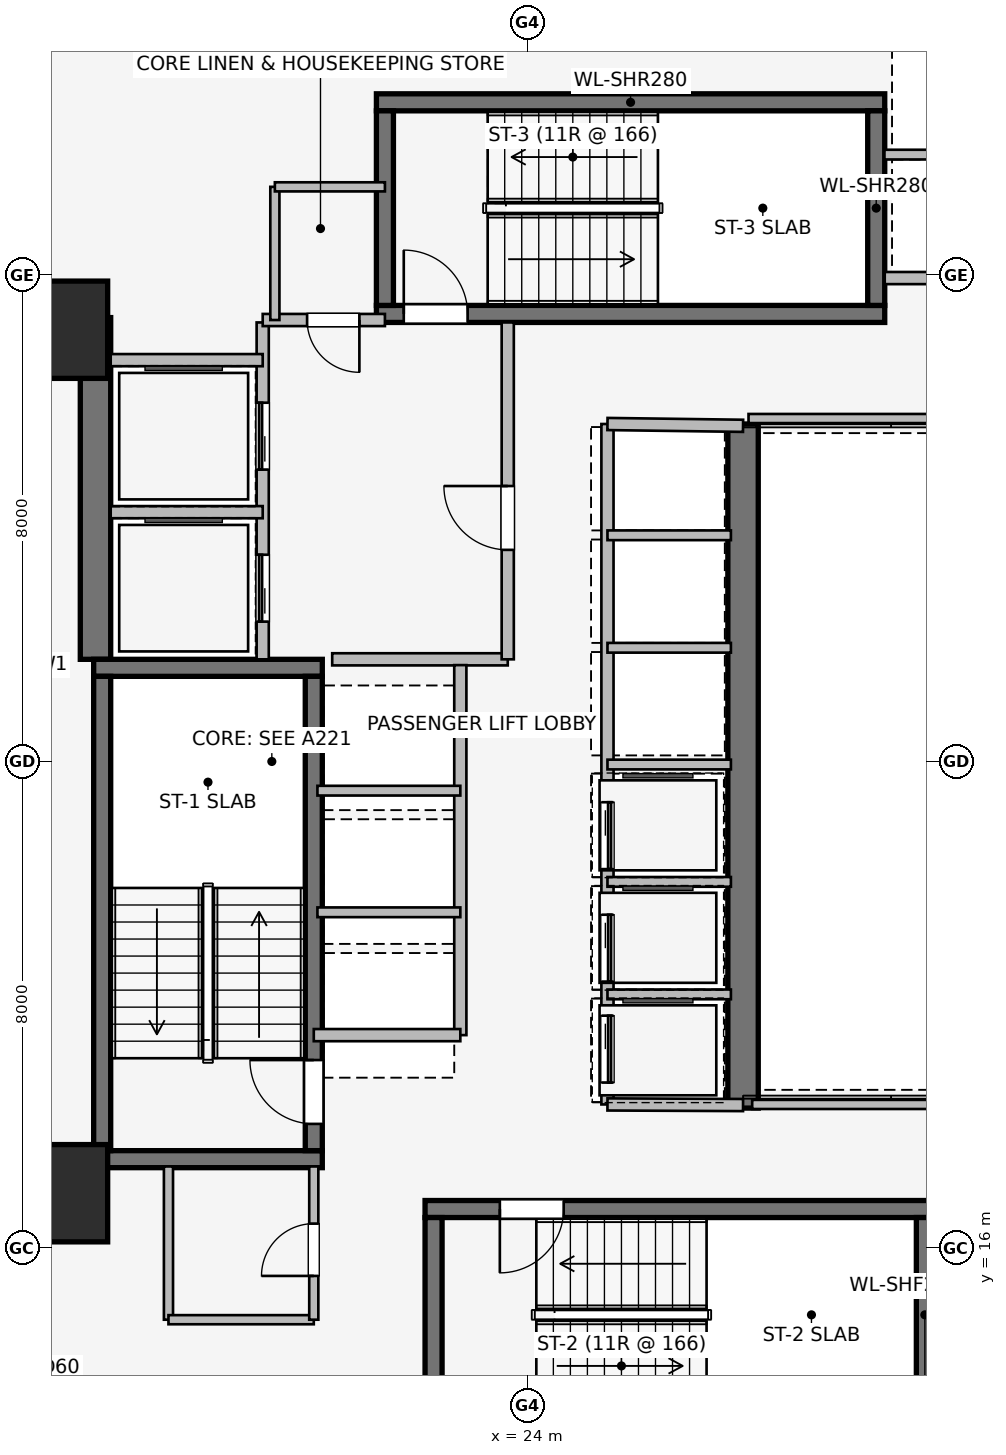
"""IFC4 building model, lengths in metres.
Left out: names, types, materials, properties, quantities, classifications, styles, units other than length and angle.
Written with IfcOpenShell. Run it as: python <this file> out.ifc"""

import sys

from ifc_helpers import new_model, si_unit, direction, frame, frame_2d, origin, origin_2d, place, context, subcontext, project, spatial, rectangle, extrude, element, fill, save


model = new_model("IFC4")
c1 = context("Model", 3, precision=1e-05, world=origin(), true_north=direction((0.0, 1.0)))
c2 = subcontext(c1, "Body", "Model", "MODEL_VIEW")
j1 = project(units=[si_unit("LENGTHUNIT", "METRE"), si_unit("PLANEANGLEUNIT", "RADIAN")], contexts=[c1])
p1 = place(None, origin())
s1 = spatial("IfcSite", under=j1, at=p1, CompositionType="ELEMENT")
p2 = place(p1, origin())
s2 = spatial("IfcBuilding", under=s1, at=p2, CompositionType="ELEMENT")
p3 = place(p2, frame((0.0, 0.0, 74.45)))
s3 = spatial("IfcBuildingStorey", under=s2, at=p3, CompositionType="ELEMENT", Elevation=74.45)
p4 = place(p3, frame((16.9, 25.68, 0.0), z_axis=(0.0, 0.0, 1.0), x_axis=(0.0, 1.0, 0.0)))
e1 = element("IfcWall", 1, at=p4, inside=s3, PredefinedType="SHEAR", context=c2, shape_type="SweptSolid", body=[
    extrude(rectangle(XDim=5.62, YDim=0.5, at=frame_2d((2.81, 0.0))), origin(), (0.0, 0.0, 1.0), 3.65),
])
p5 = place(p3, frame((27.55, 29.55, 0.0), z_axis=(0.0, 0.0, 1.0), x_axis=(0.0, -1.0, 0.0)))
e2 = element("IfcWall", 2, at=p5, inside=s3, PredefinedType="SHEAR", context=c2, shape_type="SweptSolid", body=[
    extrude(rectangle(XDim=11.25, YDim=0.5, at=frame_2d((5.625, 0.0))), origin(), (0.0, 0.0, 1.0), 3.65),
])
for number, where, z_axis, x_axis in (
    (3, (16.87, 17.46, 0.0), (0.0, 0.0, 1.0), (1.0, 0.0, 0.0)),
    (4, (20.63, 25.54, 0.0), (0.0, 0.0, 1.0), (-1.0, 0.0, 0.0)),
):
    element("IfcWall", number, at=place(p3, frame(where, z_axis=z_axis, x_axis=x_axis)), inside=s3, PredefinedType="SHEAR", context=c2, shape_type="SweptSolid", body=[
        extrude(rectangle(XDim=3.76, YDim=0.28, at=frame_2d((1.88, 0.0))), origin(), (0.0, 0.0, 1.0), 3.65),
    ])
p6 = place(p3, frame((17.01, 25.4, 0.0), z_axis=(0.0, 0.0, 1.0), x_axis=(0.0, -1.0, 0.0)))
e5 = element("IfcWall", 5, at=p6, inside=s3, PredefinedType="SHEAR", context=c2, shape_type="SweptSolid", body=[
    extrude(rectangle(XDim=7.8, YDim=0.28, at=frame_2d((3.9, 0.0))), origin(), (0.0, 0.0, 1.0), 3.65),
])
p7 = place(p3, frame((20.49, 17.6, 0.0), z_axis=(0.0, 0.0, 1.0), x_axis=(0.0, 1.0, 0.0)))
e6 = element("IfcWall", 6, at=p7, inside=s3, PredefinedType="SHEAR", context=c2, shape_type="SweptSolid", body=[
    extrude(rectangle(XDim=7.8, YDim=0.28, at=frame_2d((3.9, 0.0))), origin(), (0.0, 0.0, 1.0), 3.65),
])
p8 = place(p7, frame((0.44, 0.0, 0.0)))
e7 = element("IfcOpeningElement", 7, at=p8, cuts=e6, PredefinedType="OPENING", context=c2, shape_type="SweptSolid", body=[
    extrude(rectangle(XDim=1.05, YDim=2.0, at=frame_2d((0.525, 1.0))), frame((0.0, 0.15, 0.0), z_axis=(0.0, -1.0, 0.0), x_axis=(1.0, 0.0, 0.0)), (0.0, 0.0, 1.0), 0.3),
])
p9 = place(p3, frame((30.68, 16.64, 0.0), z_axis=(0.0, 0.0, 1.0), x_axis=(-1.0, 0.0, 0.0)))
e8 = element("IfcWall", 8, at=p9, inside=s3, PredefinedType="SHEAR", context=c2, shape_type="SweptSolid", body=[
    extrude(rectangle(XDim=8.36, YDim=0.28, at=frame_2d((4.18, 0.0))), origin(), (0.0, 0.0, 1.0), 3.65),
])
p10 = place(p9, frame((6.08, 0.0, 0.0)))
e9 = element("IfcOpeningElement", 9, at=p10, cuts=e8, PredefinedType="OPENING", context=c2, shape_type="SweptSolid", body=[
    extrude(rectangle(XDim=1.05, YDim=2.0, at=frame_2d((0.525, 1.0))), frame((0.0, 0.15, 0.0), z_axis=(0.0, -1.0, 0.0), x_axis=(1.0, 0.0, 0.0)), (0.0, 0.0, 1.0), 0.3),
])
for number, where, z_axis, x_axis in (
    (10, (22.46, 16.5, 0.0), (0.0, 0.0, 1.0), (0.0, -1.0, 0.0)),
    (11, (30.54, 13.3, 0.0), (0.0, 0.0, 1.0), (0.0, 1.0, 0.0)),
):
    element("IfcWall", number, at=place(p3, frame(where, z_axis=z_axis, x_axis=x_axis)), inside=s3, PredefinedType="SHEAR", context=c2, shape_type="SweptSolid", body=[
        extrude(rectangle(XDim=3.2, YDim=0.28, at=frame_2d((1.6, 0.0))), origin(), (0.0, 0.0, 1.0), 3.65),
    ])
p11 = place(p3, frame((21.52, 31.36, 0.0), z_axis=(0.0, 0.0, 1.0), x_axis=(1.0, 0.0, 0.0)))
e12 = element("IfcWall", 12, at=p11, inside=s3, PredefinedType="SHEAR", context=c2, shape_type="SweptSolid", body=[
    extrude(rectangle(XDim=8.36, YDim=0.28, at=frame_2d((4.18, 0.0))), origin(), (0.0, 0.0, 1.0), 3.65),
])
p12 = place(p11, frame((0.45, 0.0, 0.0)))
e13 = element("IfcOpeningElement", 13, at=p12, cuts=e12, PredefinedType="OPENING", context=c2, shape_type="SweptSolid", body=[
    extrude(rectangle(XDim=1.05, YDim=2.0, at=frame_2d((0.525, 1.0))), frame((0.0, 0.15, 0.0), z_axis=(0.0, -1.0, 0.0), x_axis=(1.0, 0.0, 0.0)), (0.0, 0.0, 1.0), 0.3),
])
p13 = place(p3, frame((29.88, 34.84, 0.0), z_axis=(0.0, 0.0, 1.0), x_axis=(-1.0, 0.0, 0.0)))
e14 = element("IfcWall", 14, at=p13, inside=s3, PredefinedType="SHEAR", context=c2, shape_type="SweptSolid", body=[
    extrude(rectangle(XDim=8.36, YDim=0.28, at=frame_2d((4.18, 0.0))), origin(), (0.0, 0.0, 1.0), 3.65),
])
for number, where, z_axis, x_axis in (
    (15, (21.66, 34.7, 0.0), (0.0, 0.0, 1.0), (0.0, -1.0, 0.0)),
    (16, (29.74, 31.5, 0.0), (0.0, 0.0, 1.0), (0.0, 1.0, 0.0)),
):
    element("IfcWall", number, at=place(p3, frame(where, z_axis=z_axis, x_axis=x_axis)), inside=s3, PredefinedType="SHEAR", context=c2, shape_type="SweptSolid", body=[
        extrude(rectangle(XDim=3.2, YDim=0.28, at=frame_2d((1.6, 0.0))), origin(), (0.0, 0.0, 1.0), 3.65),
    ])
for number, where, z_axis, x_axis in (
    (17, (16.3, 16.9, 0.0), (0.0, 0.0, 1.0), (1.0, 0.0, 0.0)),
    (18, (16.3, 31.1, 0.0), (0.0, 0.0, 1.0), (1.0, 0.0, 0.0)),
):
    element("IfcColumn", number, at=place(p3, frame(where, z_axis=z_axis, x_axis=x_axis)), inside=s3, PredefinedType="COLUMN", context=c2, shape_type="SweptSolid", body=[
        extrude(rectangle(XDim=1.6, YDim=1.6, at=origin_2d()), origin(), (0.0, 0.0, 1.0), 3.65),
    ])
p14 = place(p3, frame((19.65, 25.68, 0.0), z_axis=(0.0, 0.0, 1.0), x_axis=(0.0, 1.0, 0.0)))
e19 = element("IfcWall", 19, at=p14, inside=s3, PredefinedType="PARTITIONING", context=c2, shape_type="SweptSolid", body=[
    extrude(rectangle(XDim=5.54, YDim=0.2, at=frame_2d((2.77, 0.0))), origin(), (0.0, 0.0, 1.0), 3.39),
])
p15 = place(p14, frame((0.62, 0.0, 0.0)))
e20 = element("IfcOpeningElement", 20, at=p15, cuts=e19, PredefinedType="OPENING", context=c2, shape_type="SweptSolid", body=[
    extrude(rectangle(XDim=1.1, YDim=2.2, at=frame_2d((0.55, 1.1))), frame((0.0, 0.11, 0.0), z_axis=(0.0, -1.0, 0.0), x_axis=(1.0, 0.0, 0.0)), (0.0, 0.0, 1.0), 0.22),
])
p16 = place(p14, frame((3.12, 0.0, 0.0)))
e21 = element("IfcOpeningElement", 21, at=p16, cuts=e19, PredefinedType="OPENING", context=c2, shape_type="SweptSolid", body=[
    extrude(rectangle(XDim=1.1, YDim=2.2, at=frame_2d((0.55, 1.1))), frame((0.0, 0.11, 0.0), z_axis=(0.0, -1.0, 0.0), x_axis=(1.0, 0.0, 0.0)), (0.0, 0.0, 1.0), 0.22),
])
p17 = place(p3, frame((20.793, 25.68, 0.0), z_axis=(0.0, 0.0, 1.0), x_axis=(1.0, 0.0, 0.0)))
e22 = element("IfcWall", 22, at=p17, inside=s3, PredefinedType="PARTITIONING", context=c2, shape_type="SweptSolid", body=[
    extrude(rectangle(XDim=2.887, YDim=0.2, at=frame_2d((1.443, 0.0))), origin(), (0.0, 0.0, 1.0), 3.39),
])
p18 = place(p3, frame((23.68, 25.68, 0.0), z_axis=(0.0, 0.0, 1.0), x_axis=(0.0, 1.0, 0.0)))
e23 = element("IfcWall", 23, at=p18, inside=s3, PredefinedType="PARTITIONING", context=c2, shape_type="SweptSolid", body=[
    extrude(rectangle(XDim=5.54, YDim=0.2, at=frame_2d((2.77, 0.0))), origin(), (0.0, 0.0, 1.0), 3.39),
])
p19 = place(p18, frame((1.8, 0.0, 0.0)))
e24 = element("IfcOpeningElement", 24, at=p19, cuts=e23, PredefinedType="OPENING", context=c2, shape_type="SweptSolid", body=[
    extrude(rectangle(XDim=1.05, YDim=2.0, at=frame_2d((0.525, 1.0))), frame((0.0, 0.11, 0.0), z_axis=(0.0, -1.0, 0.0), x_axis=(1.0, 0.0, 0.0)), (0.0, 0.0, 1.0), 0.22),
])
p20 = place(p3, frame((21.66, 31.26, 0.0), z_axis=(0.0, 0.0, 1.0), x_axis=(-1.0, 0.0, 0.0)))
e25 = element("IfcWall", 25, at=p20, inside=s3, PredefinedType="PARTITIONING", context=c2, shape_type="SweptSolid", body=[
    extrude(rectangle(XDim=2.01, YDim=0.2, at=frame_2d((1.005, 0.0))), origin(), (0.0, 0.0, 1.0), 3.39),
])
p21 = place(p20, frame((0.42, 0.0, 0.0)))
e26 = element("IfcOpeningElement", 26, at=p21, cuts=e25, PredefinedType="OPENING", context=c2, shape_type="SweptSolid", body=[
    extrude(rectangle(XDim=0.86, YDim=2.0, at=frame_2d((0.43, 1.0))), frame((0.0, 0.11, 0.0), z_axis=(0.0, -1.0, 0.0), x_axis=(1.0, 0.0, 0.0)), (0.0, 0.0, 1.0), 0.22),
])
p22 = place(p3, frame((17.15, 28.1, 0.0), z_axis=(0.0, 0.0, 1.0), x_axis=(1.0, 0.0, 0.0)))
e27 = element("IfcWall", 27, at=p22, inside=s3, PredefinedType="PARTITIONING", context=c2, shape_type="SweptSolid", body=[
    extrude(rectangle(XDim=2.5, YDim=0.2, at=frame_2d((1.25, 0.0))), origin(), (0.0, 0.0, 1.0), 3.39),
])
p23 = place(p3, frame((19.65, 30.6, 0.0), z_axis=(0.0, 0.0, 1.0), x_axis=(-1.0, 0.0, 0.0)))
e28 = element("IfcWall", 28, at=p23, inside=s3, PredefinedType="PARTITIONING", context=c2, shape_type="SweptSolid", body=[
    extrude(rectangle(XDim=2.5, YDim=0.2, at=frame_2d((1.25, 0.0))), origin(), (0.0, 0.0, 1.0), 2.29),
])
p24 = place(p3, frame((32.48, 31.95, 0.0), z_axis=(0.0, 0.0, 1.0), x_axis=(-1.0, 0.0, 0.0)))
e29 = element("IfcWall", 29, at=p24, inside=s3, PredefinedType="PARTITIONING", context=c2, shape_type="SweptSolid", body=[
    extrude(rectangle(XDim=2.6, YDim=0.2, at=frame_2d((1.3, 0.0))), origin(), (0.0, 0.0, 1.0), 3.39),
])
p25 = place(p3, frame((29.875, 33.98, 0.0), z_axis=(0.0, 0.0, 1.0), x_axis=(1.0, 0.0, 0.0)))
e30 = element("IfcWall", 30, at=p25, inside=s3, PredefinedType="PARTITIONING", context=c2, shape_type="SweptSolid", body=[
    extrude(rectangle(XDim=2.605, YDim=0.16, at=frame_2d((1.302, 0.0))), origin(), (0.0, 0.0, 1.0), 3.39),
])
p26 = place(p3, frame((22.9, 19.5, 0.0), z_axis=(0.0, 0.0, 1.0), x_axis=(0.0, 1.0, 0.0)))
e31 = element("IfcWall", 31, at=p26, inside=s3, PredefinedType="PARTITIONING", context=c2, shape_type="SweptSolid", body=[
    extrude(rectangle(XDim=6.085, YDim=0.2, at=frame_2d((3.042, 0.0))), origin(), (0.0, 0.0, 1.0), 3.39),
])
p27 = place(p3, frame((20.49, 19.5, 0.0), z_axis=(0.0, 0.0, 1.0), x_axis=(1.0, 0.0, 0.0)))
e32 = element("IfcWall", 32, at=p27, inside=s3, PredefinedType="PARTITIONING", context=c2, shape_type="SweptSolid", body=[
    extrude(rectangle(XDim=2.41, YDim=0.2, at=frame_2d((1.205, 0.0))), origin(), (0.0, 0.0, 1.0), 2.29),
])
for number, where, z_axis, x_axis in (
    (33, (20.55, 21.52, 0.0), (0.0, 0.0, 1.0), (1.0, 0.0, 0.0)),
    (34, (20.55, 23.52, 0.0), (0.0, 0.0, 1.0), (1.0, 0.0, 0.0)),
):
    element("IfcWall", number, at=place(p3, frame(where, z_axis=z_axis, x_axis=x_axis)), inside=s3, PredefinedType="PARTITIONING", context=c2, shape_type="SweptSolid", body=[
        extrude(rectangle(XDim=2.35, YDim=0.16, at=frame_2d((1.175, 0.0))), origin(), (0.0, 0.0, 1.0), 3.39),
    ])
p28 = place(p3, frame((25.32, 29.55, 0.0), z_axis=(0.0, 0.0, 1.0), x_axis=(0.0, -1.0, 0.0)))
e35 = element("IfcWall", 35, at=p28, inside=s3, PredefinedType="PARTITIONING", context=c2, shape_type="SweptSolid", body=[
    extrude(rectangle(XDim=11.19, YDim=0.2, at=frame_2d((5.595, 0.0))), origin(), (0.0, 0.0, 1.0), 3.39),
])
p29 = place(p28, frame((6.22, 0.0, 0.0)))
e36 = element("IfcOpeningElement", 36, at=p29, cuts=e35, PredefinedType="OPENING", context=c2, shape_type="SweptSolid", body=[
    extrude(rectangle(XDim=1.1, YDim=2.2, at=frame_2d((0.55, 1.1))), frame((0.0, 0.11, 0.0), z_axis=(0.0, -1.0, 0.0), x_axis=(1.0, 0.0, 0.0)), (0.0, 0.0, 1.0), 0.22),
])
p30 = place(p28, frame((8.07, 0.0, 0.0)))
e37 = element("IfcOpeningElement", 37, at=p30, cuts=e35, PredefinedType="OPENING", context=c2, shape_type="SweptSolid", body=[
    extrude(rectangle(XDim=1.1, YDim=2.2, at=frame_2d((0.55, 1.1))), frame((0.0, 0.11, 0.0), z_axis=(0.0, -1.0, 0.0), x_axis=(1.0, 0.0, 0.0)), (0.0, 0.0, 1.0), 0.22),
])
p31 = place(p28, frame((9.73, 0.0, 0.0)))
e38 = element("IfcOpeningElement", 38, at=p31, cuts=e35, PredefinedType="OPENING", context=c2, shape_type="SweptSolid", body=[
    extrude(rectangle(XDim=1.1, YDim=2.2, at=frame_2d((0.55, 1.1))), frame((0.0, 0.11, 0.0), z_axis=(0.0, -1.0, 0.0), x_axis=(1.0, 0.0, 0.0)), (0.0, 0.0, 1.0), 0.22),
])
p32 = place(p3, frame((25.32, 18.36, 0.0), z_axis=(0.0, 0.0, 1.0), x_axis=(0.999989925833, -0.004488678231, 0.0)))
e39 = element("IfcWall", 39, at=p32, inside=s3, PredefinedType="PARTITIONING", context=c2, shape_type="SweptSolid", body=[
    extrude(rectangle(XDim=2.23, YDim=0.2, at=frame_2d((1.115, 0.0))), origin(), (0.0, 0.0, 1.0), 3.39),
])
p33 = place(p3, frame((27.55, 29.52, 0.0), z_axis=(0.0, 0.0, 1.0), x_axis=(-0.999909343457, 0.013464949556, 0.0)))
e40 = element("IfcWall", 40, at=p33, inside=s3, PredefinedType="PARTITIONING", context=c2, shape_type="SweptSolid", body=[
    extrude(rectangle(XDim=2.23, YDim=0.2, at=frame_2d((1.115, 0.0))), origin(), (0.0, 0.0, 1.0), 2.29),
])
for number, where, z_axis, x_axis in (
    (41, (25.32, 20.17, 0.0), (0.0, 0.0, 1.0), (1.0, 0.0, 0.0)),
    (42, (25.32, 22.02, 0.0), (0.0, 0.0, 1.0), (1.0, 0.0, 0.0)),
    (43, (25.32, 23.95, 0.0), (0.0, 0.0, 1.0), (1.0, 0.0, 0.0)),
    (44, (25.32, 25.87, 0.0), (0.0, 0.0, 1.0), (1.0, 0.0, 0.0)),
    (45, (25.32, 27.72, 0.0), (0.0, 0.0, 1.0), (1.0, 0.0, 0.0)),
):
    element("IfcWall", number, at=place(p3, frame(where, z_axis=z_axis, x_axis=x_axis)), inside=s3, PredefinedType="PARTITIONING", context=c2, shape_type="SweptSolid", body=[
        extrude(rectangle(XDim=2.03, YDim=0.16, at=frame_2d((1.015, 0.0))), origin(), (0.0, 0.0, 1.0), 3.39),
    ])
p34 = place(p3, frame((18.1, 17.34, 0.0), z_axis=(0.0, 0.0, 1.0), x_axis=(0.0, -1.0, 0.0)))
e46 = element("IfcWall", 46, at=p34, inside=s3, PredefinedType="PARTITIONING", context=c2, shape_type="SweptSolid", body=[
    extrude(rectangle(XDim=2.52, YDim=0.15, at=frame_2d((1.26, 0.0))), origin(), (0.0, 0.0, 1.0), 3.39),
])
p35 = place(p3, frame((18.1, 14.82, 0.0), z_axis=(0.0, 0.0, 1.0), x_axis=(1.0, 0.0, 0.0)))
e47 = element("IfcWall", 47, at=p35, inside=s3, PredefinedType="PARTITIONING", context=c2, shape_type="SweptSolid", body=[
    extrude(rectangle(XDim=2.39, YDim=0.15, at=frame_2d((1.195, 0.0))), origin(), (0.0, 0.0, 1.0), 3.39),
])
p36 = place(p3, frame((20.49, 14.82, 0.0), z_axis=(0.0, 0.0, 1.0), x_axis=(0.0, 1.0, 0.0)))
e48 = element("IfcWall", 48, at=p36, inside=s3, PredefinedType="PARTITIONING", context=c2, shape_type="SweptSolid", body=[
    extrude(rectangle(XDim=2.52, YDim=0.15, at=frame_2d((1.26, 0.0))), origin(), (0.0, 0.0, 1.0), 3.39),
])
p37 = place(p36, frame((0.72, 0.0, 0.0)))
e49 = element("IfcOpeningElement", 49, at=p37, cuts=e48, PredefinedType="OPENING", context=c2, shape_type="SweptSolid", body=[
    extrude(rectangle(XDim=0.86, YDim=2.0, at=frame_2d((0.43, 1.0))), frame((0.0, 0.085, 0.0), z_axis=(0.0, -1.0, 0.0), x_axis=(1.0, 0.0, 0.0)), (0.0, 0.0, 1.0), 0.17),
])
p38 = place(p3, frame((19.85, 33.45, 0.0), z_axis=(0.0, 0.0, 1.0), x_axis=(0.0, -1.0, 0.0)))
e50 = element("IfcWall", 50, at=p38, inside=s3, PredefinedType="PARTITIONING", context=c2, shape_type="SweptSolid", body=[
    extrude(rectangle(XDim=2.19, YDim=0.15, at=frame_2d((1.095, 0.0))), origin(), (0.0, 0.0, 1.0), 3.39),
])
p39 = place(p3, frame((21.66, 33.45, 0.0), z_axis=(0.0, 0.0, 1.0), x_axis=(-1.0, 0.0, 0.0)))
e51 = element("IfcWall", 51, at=p39, inside=s3, PredefinedType="PARTITIONING", context=c2, shape_type="SweptSolid", body=[
    extrude(rectangle(XDim=1.81, YDim=0.15, at=frame_2d((0.905, 0.0))), origin(), (0.0, 0.0, 1.0), 3.39),
])
p40 = place(p3, frame((27.7, 18.36, 0.0), z_axis=(0.0, 0.0, 1.0), x_axis=(1.0, 0.0, 0.0)))
e52 = element("IfcWall", 52, at=p40, inside=s3, PredefinedType="PARTITIONING", context=c2, shape_type="SweptSolid", body=[
    extrude(rectangle(XDim=12.14, YDim=0.15, at=frame_2d((6.07, 0.0))), origin(), (0.0, 0.0, 1.0), 2.531),
])
p41 = place(p3, frame((39.84, 29.64, 0.0), z_axis=(0.0, 0.0, 1.0), x_axis=(-1.0, 0.0, 0.0)))
e53 = element("IfcWall", 53, at=p41, inside=s3, PredefinedType="PARTITIONING", context=c2, shape_type="SweptSolid", body=[
    extrude(rectangle(XDim=12.2, YDim=0.15, at=frame_2d((6.1, 0.0))), origin(), (0.0, 0.0, 1.0), 2.531),
])
p42 = place(p8, origin())
e54 = element("IfcDoor", 54, at=p42, inside=s3, OperationType="SINGLE_SWING_RIGHT", PredefinedType="DOOR", context=c2, shape_type="SweptSolid", body=[
    extrude(rectangle(XDim=1.05, YDim=2.0, at=frame_2d((0.525, 1.0))), frame((0.0, 0.025, 0.0), z_axis=(0.0, -1.0, 0.0), x_axis=(1.0, 0.0, 0.0)), (0.0, 0.0, 1.0), 0.05),
])
fill(e7, e54)
p43 = place(p10, origin())
e55 = element("IfcDoor", 55, at=p43, inside=s3, OperationType="SINGLE_SWING_RIGHT", PredefinedType="DOOR", context=c2, shape_type="SweptSolid", body=[
    extrude(rectangle(XDim=1.05, YDim=2.0, at=frame_2d((0.525, 1.0))), frame((0.0, 0.025, 0.0), z_axis=(0.0, -1.0, 0.0), x_axis=(1.0, 0.0, 0.0)), (0.0, 0.0, 1.0), 0.05),
])
fill(e9, e55)
p44 = place(p12, origin())
e56 = element("IfcDoor", 56, at=p44, inside=s3, OperationType="SINGLE_SWING_LEFT", PredefinedType="DOOR", context=c2, shape_type="SweptSolid", body=[
    extrude(rectangle(XDim=1.05, YDim=2.0, at=frame_2d((0.525, 1.0))), frame((0.0, 0.025, 0.0), z_axis=(0.0, -1.0, 0.0), x_axis=(1.0, 0.0, 0.0)), (0.0, 0.0, 1.0), 0.05),
])
fill(e13, e56)
p45 = place(p15, origin())
e57 = element("IfcDoor", 57, at=p45, inside=s3, OperationType="SLIDING_TO_LEFT", PredefinedType="DOOR", context=c2, shape_type="SweptSolid", body=[
    extrude(rectangle(XDim=1.1, YDim=2.2, at=frame_2d((0.55, 1.1))), frame((0.0, 0.025, 0.0), z_axis=(0.0, -1.0, 0.0), x_axis=(1.0, 0.0, 0.0)), (0.0, 0.0, 1.0), 0.05),
])
fill(e20, e57)
p46 = place(p16, origin())
e58 = element("IfcDoor", 58, at=p46, inside=s3, OperationType="SLIDING_TO_LEFT", PredefinedType="DOOR", context=c2, shape_type="SweptSolid", body=[
    extrude(rectangle(XDim=1.1, YDim=2.2, at=frame_2d((0.55, 1.1))), frame((0.0, 0.025, 0.0), z_axis=(0.0, -1.0, 0.0), x_axis=(1.0, 0.0, 0.0)), (0.0, 0.0, 1.0), 0.05),
])
fill(e21, e58)
p47 = place(p19, origin())
e59 = element("IfcDoor", 59, at=p47, inside=s3, OperationType="SINGLE_SWING_RIGHT", PredefinedType="DOOR", context=c2, shape_type="SweptSolid", body=[
    extrude(rectangle(XDim=1.05, YDim=2.0, at=frame_2d((0.525, 1.0))), frame((0.0, 0.025, 0.0), z_axis=(0.0, -1.0, 0.0), x_axis=(1.0, 0.0, 0.0)), (0.0, 0.0, 1.0), 0.05),
])
fill(e24, e59)
p48 = place(p21, origin())
e60 = element("IfcDoor", 60, at=p48, inside=s3, OperationType="SINGLE_SWING_LEFT", PredefinedType="DOOR", context=c2, shape_type="SweptSolid", body=[
    extrude(rectangle(XDim=0.86, YDim=2.0, at=frame_2d((0.43, 1.0))), frame((0.0, 0.025, 0.0), z_axis=(0.0, -1.0, 0.0), x_axis=(1.0, 0.0, 0.0)), (0.0, 0.0, 1.0), 0.05),
])
fill(e26, e60)
p49 = place(p29, origin())
e61 = element("IfcDoor", 61, at=p49, inside=s3, OperationType="SLIDING_TO_LEFT", PredefinedType="DOOR", context=c2, shape_type="SweptSolid", body=[
    extrude(rectangle(XDim=1.1, YDim=2.2, at=frame_2d((0.55, 1.1))), frame((0.0, 0.025, 0.0), z_axis=(0.0, -1.0, 0.0), x_axis=(1.0, 0.0, 0.0)), (0.0, 0.0, 1.0), 0.05),
])
fill(e36, e61)
p50 = place(p30, origin())
e62 = element("IfcDoor", 62, at=p50, inside=s3, OperationType="SLIDING_TO_LEFT", PredefinedType="DOOR", context=c2, shape_type="SweptSolid", body=[
    extrude(rectangle(XDim=1.1, YDim=2.2, at=frame_2d((0.55, 1.1))), frame((0.0, 0.025, 0.0), z_axis=(0.0, -1.0, 0.0), x_axis=(1.0, 0.0, 0.0)), (0.0, 0.0, 1.0), 0.05),
])
fill(e37, e62)
p51 = place(p31, origin())
e63 = element("IfcDoor", 63, at=p51, inside=s3, OperationType="SLIDING_TO_LEFT", PredefinedType="DOOR", context=c2, shape_type="SweptSolid", body=[
    extrude(rectangle(XDim=1.1, YDim=2.2, at=frame_2d((0.55, 1.1))), frame((0.0, 0.025, 0.0), z_axis=(0.0, -1.0, 0.0), x_axis=(1.0, 0.0, 0.0)), (0.0, 0.0, 1.0), 0.05),
])
fill(e38, e63)
p52 = place(p37, origin())
e64 = element("IfcDoor", 64, at=p52, inside=s3, OperationType="SINGLE_SWING_LEFT", PredefinedType="DOOR", context=c2, shape_type="SweptSolid", body=[
    extrude(rectangle(XDim=0.86, YDim=2.0, at=frame_2d((0.43, 1.0))), frame((0.0, 0.025, 0.0), z_axis=(0.0, -1.0, 0.0), x_axis=(1.0, 0.0, 0.0)), (0.0, 0.0, 1.0), 0.05),
])
fill(e49, e64)
save(model, sys.argv[1])
